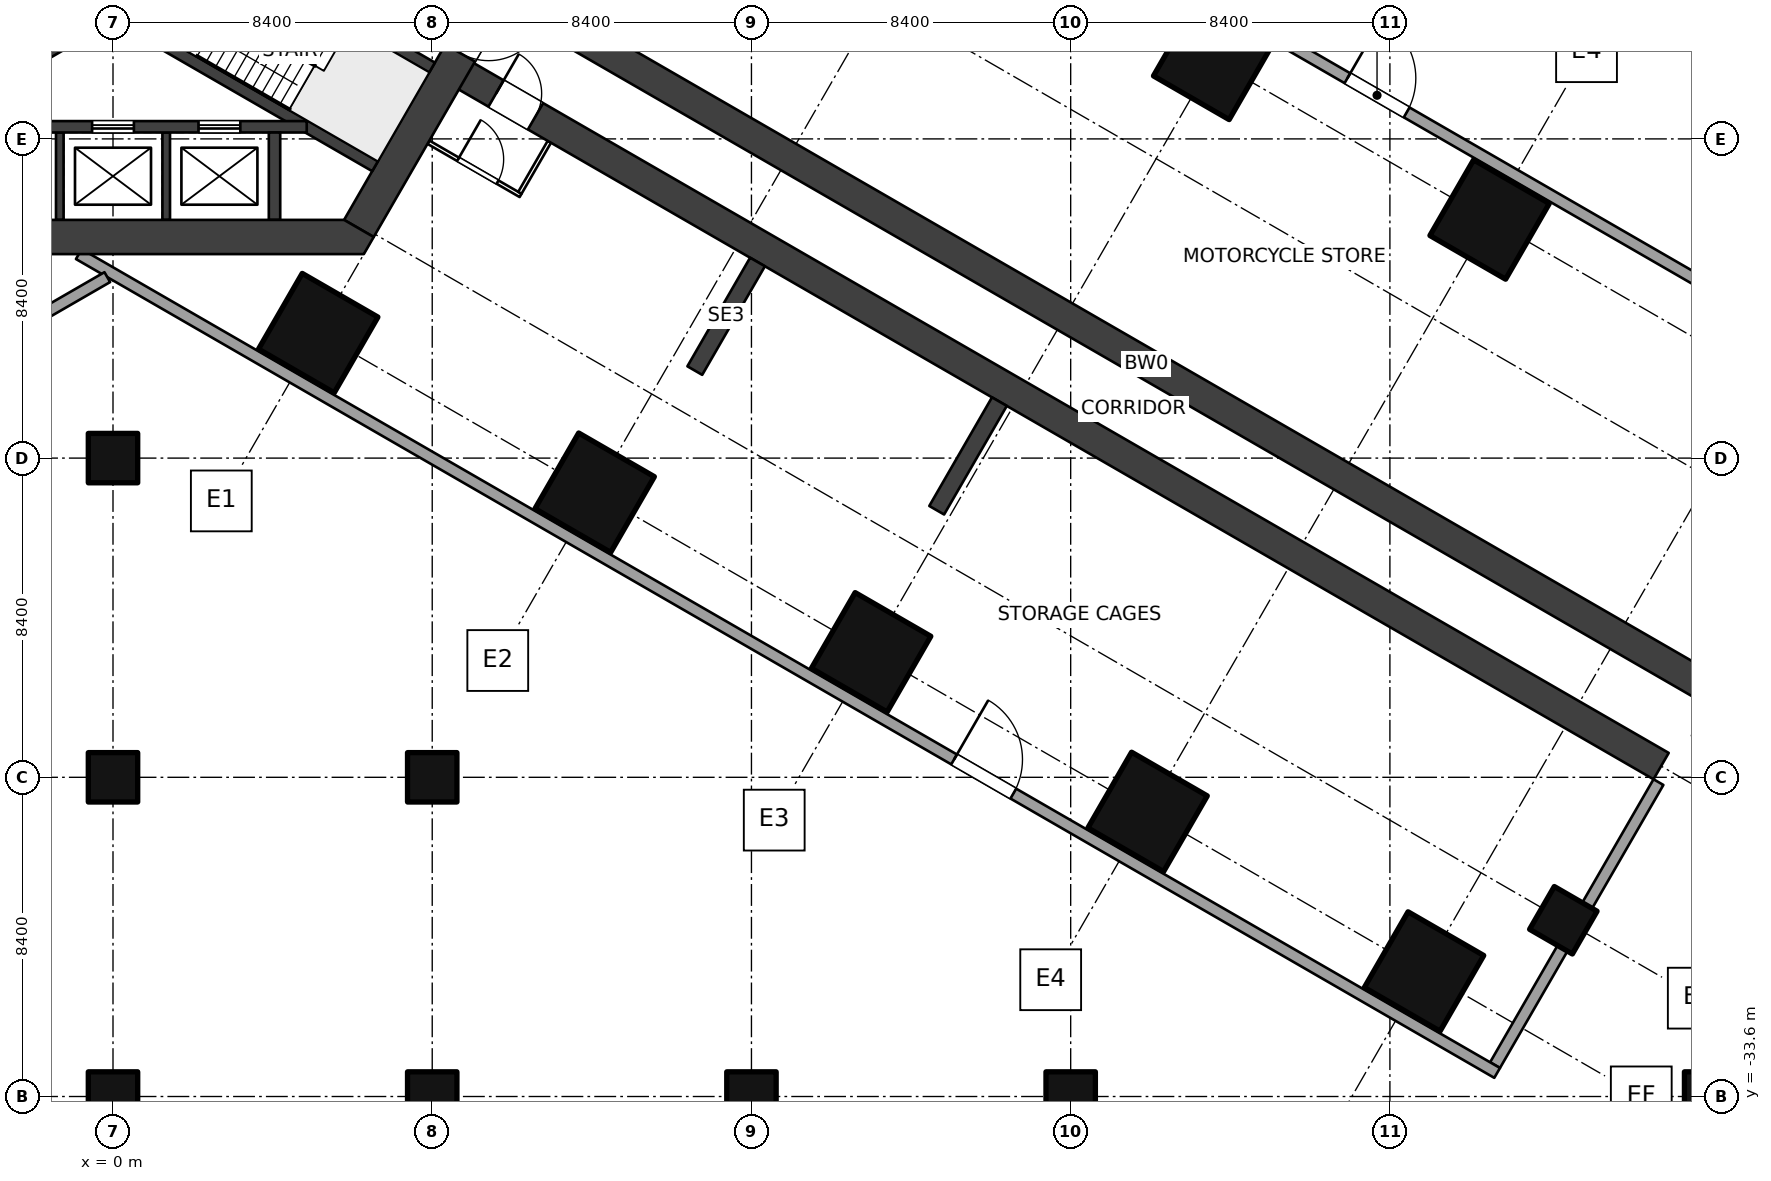
"""IFC4 building model, lengths in metres.
Left out: names, types, materials, properties, quantities, classifications, styles, units other than length and angle.
Written with IfcOpenShell. Run it as: python <this file> out.ifc"""

import sys

from ifc_helpers import new_model, si_unit, direction, frame, frame_2d, origin, origin_2d, place, context, subcontext, project, spatial, polyline, rectangle, outline, extrude, element, fill, save


model = new_model("IFC4")
c1 = context("Model", 3, precision=1e-05, world=origin(), true_north=direction((0.0, 1.0)))
c2 = subcontext(c1, "Body", "Model", "MODEL_VIEW")
j1 = project(units=[si_unit("LENGTHUNIT", "METRE"), si_unit("PLANEANGLEUNIT", "RADIAN")], contexts=[c1])
p1 = place(None, origin())
s1 = spatial("IfcSite", under=j1, at=p1, CompositionType="ELEMENT")
p2 = place(p1, origin())
s2 = spatial("IfcBuilding", under=s1, at=p2, CompositionType="ELEMENT")
p3 = place(p2, frame((0.0, 0.0, -7.0)))
s3 = spatial("IfcBuildingStorey", under=s2, at=p3, CompositionType="ELEMENT", Elevation=-7.0)
for number, where, z_axis, x_axis in (
    (1, (5.4, -13.51, 0.0), (0.0, 0.0, 1.0), (-0.5, -0.866, 0.0)),
    (2, (12.675, -17.71, 0.0), (0.0, 0.0, 1.0), (-0.5, -0.866, 0.0)),
    (3, (28.949, -6.322, 0.0), (0.0, 0.0, 1.0), (-0.5, -0.866, 0.0)),
    (4, (19.949, -21.91, 0.0), (0.0, 0.0, 1.0), (-0.5, -0.866, 0.0)),
    (5, (36.224, -10.521, 0.0), (0.0, 0.0, 1.0), (-0.5, -0.866, 0.0)),
    (6, (27.224, -26.11, 0.0), (0.0, 0.0, 1.0), (-0.5, -0.866, 0.0)),
    (7, (34.499, -30.31, 0.0), (0.0, 0.0, 1.0), (-0.5, -0.866, 0.0)),
):
    element("IfcColumn", number, at=place(p3, frame(where, z_axis=z_axis, x_axis=x_axis)), inside=s3, PredefinedType="COLUMN", context=c2, shape_type="SweptSolid", body=[
        extrude(rectangle(XDim=2.3, YDim=2.3, at=origin_2d()), origin(), (0.0, 0.0, 1.0), 3.5),
    ])
for number, where, z_axis, x_axis in (
    (8, (38.164, -28.962, 0.0), (0.0, 0.0, 1.0), (-0.5, -0.866, 0.0)),
    (9, (0.0, -33.6, 0.0), (0.0, 0.0, 1.0), (1.0, 0.0, 0.0)),
    (10, (0.0, -25.2, 0.0), (0.0, 0.0, 1.0), (1.0, 0.0, 0.0)),
    (11, (0.0, -16.8, 0.0), (0.0, 0.0, 1.0), (1.0, 0.0, 0.0)),
    (12, (8.4, -33.6, 0.0), (0.0, 0.0, 1.0), (1.0, 0.0, 0.0)),
    (13, (8.4, -25.2, 0.0), (0.0, 0.0, 1.0), (1.0, 0.0, 0.0)),
    (14, (16.8, -33.6, 0.0), (0.0, 0.0, 1.0), (1.0, 0.0, 0.0)),
    (15, (25.2, -33.6, 0.0), (0.0, 0.0, 1.0), (1.0, 0.0, 0.0)),
    (16, (42.0, -33.6, 0.0), (0.0, 0.0, 1.0), (1.0, 0.0, 0.0)),
):
    element("IfcColumn", number, at=place(p3, frame(where, z_axis=z_axis, x_axis=x_axis)), inside=s3, PredefinedType="COLUMN", context=c2, shape_type="SweptSolid", body=[
        extrude(rectangle(XDim=1.3, YDim=1.3, at=origin_2d()), origin(), (0.0, 0.0, 1.0), 3.5),
    ])
p4 = place(p3, frame((12.551, -0.225, 0.0), z_axis=(0.0, 0.0, 1.0), x_axis=(-0.499997612506, -0.8660267822, 0.0)))
e17 = element("IfcWall", 17, at=p4, inside=s3, PredefinedType="SHEAR", context=c2, shape_type="SweptSolid", body=[
    extrude(rectangle(XDim=12.161, YDim=0.9, at=frame_2d((6.08, 0.0))), origin(), (0.0, 0.0, 1.0), 3.5),
])
p5 = place(p4, frame((5.33, 0.0, 0.0)))
e18 = element("IfcOpeningElement", 18, at=p5, cuts=e17, PredefinedType="OPENING", context=c2, shape_type="SweptSolid", body=[
    extrude(rectangle(XDim=1.5, YDim=2.1, at=frame_2d((0.75, 1.05))), frame((0.0, 0.46, 0.0), z_axis=(0.0, -1.0, 0.0), x_axis=(1.0, 0.0, 0.0)), (0.0, 0.0, 1.0), 0.92),
])
p6 = place(p3, origin())
e19 = element("IfcWall", 19, at=p6, inside=s3, PredefinedType="SHEAR", context=c2, shape_type="SweptSolid", body=[
    extrude(outline(polyline([(-6.6, -11.432), (6.6, -11.432), (6.86, -10.981), (6.08, -10.531), (-6.08, -10.531), (-6.86, -10.981), (-6.6, -11.432)])), origin(), (0.0, 0.0, 1.0), 3.5),
])
p7 = place(p3, frame((-0.919, -5.669, 0.0), z_axis=(0.0, 0.0, 1.0), x_axis=(-0.866011800373, -0.500023561059, 0.0)))
e20 = element("IfcWall", 20, at=p7, inside=s3, PredefinedType="SHEAR", context=c2, shape_type="SweptSolid", body=[
    extrude(rectangle(XDim=6.902, YDim=0.3, at=frame_2d((3.451, 0.0))), origin(), (0.0, 0.0, 1.0), 3.5),
])
p8 = place(p3, frame((2.419, -3.071, 0.0), z_axis=(0.0, 0.0, 1.0), x_axis=(0.86602711848, -0.499997030048, 0.0)))
e21 = element("IfcWall", 21, at=p8, inside=s3, PredefinedType="SHEAR", context=c2, shape_type="SweptSolid", body=[
    extrude(rectangle(XDim=6.901, YDim=0.3, at=frame_2d((3.451, 0.0))), origin(), (0.0, 0.0, 1.0), 3.5),
])
p9 = place(p8, frame((0.25, 0.0, 0.0)))
e22 = element("IfcOpeningElement", 22, at=p9, cuts=e21, PredefinedType="OPENING", context=c2, shape_type="SweptSolid", body=[
    extrude(rectangle(XDim=1.0, YDim=2.1, at=frame_2d((0.5, 1.05))), frame((0.0, 0.16, 0.0), z_axis=(0.0, -1.0, 0.0), x_axis=(1.0, 0.0, 0.0)), (0.0, 0.0, 1.0), 0.32),
])
p10 = place(p3, frame((0.919, -5.669, 0.0), z_axis=(0.0, 0.0, 1.0), x_axis=(0.866011800373, -0.500023561059, 0.0)))
e23 = element("IfcWall", 23, at=p10, inside=s3, PredefinedType="SHEAR", context=c2, shape_type="SweptSolid", body=[
    extrude(rectangle(XDim=6.902, YDim=0.3, at=frame_2d((3.451, 0.0))), origin(), (0.0, 0.0, 1.0), 3.5),
])
p11 = place(p3, frame((5.098, -8.082, 0.0), z_axis=(0.0, 0.0, 1.0), x_axis=(-1.0, 0.0, 0.0)))
e24 = element("IfcWall", 24, at=p11, inside=s3, PredefinedType="SHEAR", context=c2, shape_type="SweptSolid", body=[
    extrude(rectangle(XDim=10.195, YDim=0.3, at=frame_2d((5.098, 0.0))), origin(), (0.0, 0.0, 1.0), 3.5),
])
p12 = place(p11, frame((1.748, 0.0, 0.0)))
e25 = element("IfcOpeningElement", 25, at=p12, cuts=e24, PredefinedType="OPENING", context=c2, shape_type="SweptSolid", body=[
    extrude(rectangle(XDim=1.1, YDim=2.1, at=frame_2d((0.55, 1.05))), frame((0.0, 0.16, 0.0), z_axis=(0.0, -1.0, 0.0), x_axis=(1.0, 0.0, 0.0)), (0.0, 0.0, 1.0), 0.32),
])
p13 = place(p11, frame((4.548, 0.0, 0.0)))
e26 = element("IfcOpeningElement", 26, at=p13, cuts=e24, PredefinedType="OPENING", context=c2, shape_type="SweptSolid", body=[
    extrude(rectangle(XDim=1.1, YDim=2.1, at=frame_2d((0.55, 1.05))), frame((0.0, 0.16, 0.0), z_axis=(0.0, -1.0, 0.0), x_axis=(1.0, 0.0, 0.0)), (0.0, 0.0, 1.0), 0.32),
])
p14 = place(p11, frame((7.348, 0.0, 0.0)))
e27 = element("IfcOpeningElement", 27, at=p14, cuts=e24, PredefinedType="OPENING", context=c2, shape_type="SweptSolid", body=[
    extrude(rectangle(XDim=1.1, YDim=2.1, at=frame_2d((0.55, 1.05))), frame((0.0, 0.16, 0.0), z_axis=(0.0, -1.0, 0.0), x_axis=(1.0, 0.0, 0.0)), (0.0, 0.0, 1.0), 0.32),
])
p15 = place(p3, frame((4.25, -8.231, 0.0), z_axis=(0.0, 0.0, 1.0), x_axis=(0.0, -1.0, 0.0)))
e28 = element("IfcWall", 28, at=p15, inside=s3, PredefinedType="SHEAR", context=c2, shape_type="SweptSolid", body=[
    extrude(rectangle(XDim=2.3, YDim=0.3, at=frame_2d((1.15, 0.0))), origin(), (0.0, 0.0, 1.0), 3.5),
])
for number, where, z_axis, x_axis in (
    (29, (1.4, -8.231, 0.0), (0.0, 0.0, 1.0), (0.0, -1.0, 0.0)),
    (30, (-1.4, -8.231, 0.0), (0.0, 0.0, 1.0), (0.0, -1.0, 0.0)),
):
    element("IfcWall", number, at=place(p3, frame(where, z_axis=z_axis, x_axis=x_axis)), inside=s3, PredefinedType="SHEAR", context=c2, shape_type="SweptSolid", body=[
        extrude(rectangle(XDim=2.3, YDim=0.2, at=frame_2d((1.15, 0.0))), origin(), (0.0, 0.0, 1.0), 3.5),
    ])
p16 = place(p3, frame((10.11, -4.451, 0.0), z_axis=(0.0, 0.0, 1.0), x_axis=(0.866025284237, -0.500000207062, 0.0)))
e31 = element("IfcWall", 31, at=p16, inside=s3, PredefinedType="SHEAR", context=c2, shape_type="SweptSolid", body=[
    extrude(rectangle(XDim=36.75, YDim=0.8, at=frame_2d((18.375, 0.0))), origin(), (0.0, 0.0, 1.0), 3.5),
])
p17 = place(p16, frame((1.35, 0.0, 0.0)))
e32 = element("IfcOpeningElement", 32, at=p17, cuts=e31, PredefinedType="OPENING", context=c2, shape_type="SweptSolid", body=[
    extrude(rectangle(XDim=1.2, YDim=2.1, at=frame_2d((0.6, 1.05))), frame((0.0, 0.41, 0.0), z_axis=(0.0, -1.0, 0.0), x_axis=(1.0, 0.0, 0.0)), (0.0, 0.0, 1.0), 0.82),
])
p18 = place(p3, frame((8.91, -6.53, 0.0), z_axis=(0.0, 0.0, 1.0), x_axis=(0.866025284237, -0.500000207062, 0.0)))
e33 = element("IfcWall", 33, at=p18, inside=s3, PredefinedType="SHEAR", context=c2, shape_type="SweptSolid", body=[
    extrude(rectangle(XDim=36.75, YDim=0.8, at=frame_2d((18.375, 0.0))), origin(), (0.0, 0.0, 1.0), 3.5),
])
p19 = place(p18, frame((1.35, 0.0, 0.0)))
e34 = element("IfcOpeningElement", 34, at=p19, cuts=e33, PredefinedType="OPENING", context=c2, shape_type="SweptSolid", body=[
    extrude(rectangle(XDim=1.2, YDim=2.1, at=frame_2d((0.6, 1.05))), frame((0.0, 0.41, 0.0), z_axis=(0.0, -1.0, 0.0), x_axis=(1.0, 0.0, 0.0)), (0.0, 0.0, 1.0), 0.82),
])
p20 = place(p3, frame((8.3, -8.487, 0.0), z_axis=(0.0, 0.0, 1.0), x_axis=(0.866034573852, -0.49998411664, 0.0)))
e35 = element("IfcWall", 35, at=p20, inside=s3, PredefinedType="PARTITIONING", context=c2, shape_type="SweptSolid", body=[
    extrude(rectangle(XDim=2.8, YDim=0.1, at=frame_2d((1.4, 0.0))), origin(), (0.0, 0.0, 1.0), 3.2),
])
p21 = place(p20, frame((0.9, 0.0, 0.0)))
e36 = element("IfcOpeningElement", 36, at=p21, cuts=e35, PredefinedType="OPENING", context=c2, shape_type="SweptSolid", body=[
    extrude(rectangle(XDim=1.2, YDim=2.1, at=frame_2d((0.6, 1.05))), frame((0.0, 0.06, 0.0), z_axis=(0.0, -1.0, 0.0), x_axis=(1.0, 0.0, 0.0)), (0.0, 0.0, 1.0), 0.12),
])
p22 = place(p3, frame((11.482, -8.476, 0.0), z_axis=(0.0, 0.0, 1.0), x_axis=(-0.500017819788, -0.86601511528, 0.0)))
e37 = element("IfcWall", 37, at=p22, inside=s3, PredefinedType="PARTITIONING", context=c2, shape_type="SweptSolid", body=[
    extrude(rectangle(XDim=1.55, YDim=0.1, at=frame_2d((0.775, 0.0))), origin(), (0.0, 0.0, 1.0), 3.2),
])
p23 = place(p3, frame((40.667, -25.326, 0.0), z_axis=(0.0, 0.0, 1.0), x_axis=(-0.500007509209, -0.866021068297, 0.0)))
e38 = element("IfcWall", 38, at=p23, inside=s3, PredefinedType="SOLIDWALL", context=c2, shape_type="SweptSolid", body=[
    extrude(rectangle(XDim=8.6, YDim=0.3, at=frame_2d((4.3, 0.0))), origin(), (0.0, 0.0, 1.0), 1.9),
])
p24 = place(p3, frame((-0.15, -12.038, 0.0), z_axis=(0.0, 0.0, 1.0), x_axis=(-0.866026292622, -0.499998460486, 0.0)))
e39 = element("IfcWall", 39, at=p24, inside=s3, PredefinedType="SOLIDWALL", context=c2, shape_type="SweptSolid", body=[
    extrude(rectangle(XDim=41.883, YDim=0.3, at=frame_2d((20.941, 0.0))), origin(), (0.0, 0.0, 1.0), 3.2),
])
p25 = place(p24, frame((25.383, 0.0, 0.0)))
e40 = element("IfcOpeningElement", 40, at=p25, cuts=e39, PredefinedType="OPENING", context=c2, shape_type="SweptSolid", body=[
    extrude(rectangle(XDim=1.8, YDim=2.4, at=frame_2d((0.9, 1.2))), frame((0.0, 0.16, 0.0), z_axis=(0.0, -1.0, 0.0), x_axis=(1.0, 0.0, 0.0)), (0.0, 0.0, 1.0), 0.32),
])
p26 = place(p3, frame((9.45, 6.495, 0.0), z_axis=(0.0, 0.0, 1.0), x_axis=(0.866025301493, -0.500000177174, 0.0)))
e41 = element("IfcWall", 41, at=p26, inside=s3, PredefinedType="SOLIDWALL", context=c2, shape_type="SweptSolid", body=[
    extrude(rectangle(XDim=43.095, YDim=0.3, at=frame_2d((21.548, 0.0))), origin(), (0.0, 0.0, 1.0), 3.2),
])
p27 = place(p26, frame((26.595, 0.0, 0.0)))
e42 = element("IfcOpeningElement", 42, at=p27, cuts=e41, PredefinedType="OPENING", context=c2, shape_type="SweptSolid", body=[
    extrude(rectangle(XDim=1.8, YDim=2.4, at=frame_2d((0.9, 1.2))), frame((0.0, 0.16, 0.0), z_axis=(0.0, -1.0, 0.0), x_axis=(1.0, 0.0, 0.0)), (0.0, 0.0, 1.0), 0.32),
])
p28 = place(p3, frame((-0.9, -11.432, 0.0), z_axis=(0.0, 0.0, 1.0), x_axis=(0.866025301493, -0.500000177174, 0.0)))
e43 = element("IfcWall", 43, at=p28, inside=s3, PredefinedType="SOLIDWALL", context=c2, shape_type="SweptSolid", body=[
    extrude(rectangle(XDim=43.095, YDim=0.3, at=frame_2d((21.548, 0.0))), origin(), (0.0, 0.0, 1.0), 3.2),
])
p29 = place(p28, frame((26.595, 0.0, 0.0)))
e44 = element("IfcOpeningElement", 44, at=p29, cuts=e43, PredefinedType="OPENING", context=c2, shape_type="SweptSolid", body=[
    extrude(rectangle(XDim=1.8, YDim=2.4, at=frame_2d((0.9, 1.2))), frame((0.0, 0.16, 0.0), z_axis=(0.0, -1.0, 0.0), x_axis=(1.0, 0.0, 0.0)), (0.0, 0.0, 1.0), 0.32),
])
for number, where, z_axis, x_axis in (
    (45, (16.959, -11.639, 0.0), (0.0, 0.0, 1.0), (-0.5, -0.866, 0.0)),
    (46, (23.324, -15.314, 0.0), (0.0, 0.0, 1.0), (-0.5, -0.866, 0.0)),
):
    element("IfcWall", number, at=place(p3, frame(where, z_axis=z_axis, x_axis=x_axis)), inside=s3, PredefinedType="SOLIDWALL", context=c2, shape_type="SweptSolid", body=[
        extrude(rectangle(XDim=3.3, YDim=0.45, at=frame_2d((1.65, 0.0))), origin(), (0.0, 0.0, 1.0), 3.5),
    ])
p30 = place(p12, origin())
e47 = element("IfcDoor", 47, at=p30, inside=s3, OperationType="DOUBLE_DOOR_SLIDING", PredefinedType="DOOR", context=c2, shape_type="SweptSolid", body=[
    extrude(rectangle(XDim=1.1, YDim=2.1, at=frame_2d((0.55, 1.05))), frame((0.0, 0.025, 0.0), z_axis=(0.0, -1.0, 0.0), x_axis=(1.0, 0.0, 0.0)), (0.0, 0.0, 1.0), 0.05),
])
fill(e25, e47)
p31 = place(p13, origin())
e48 = element("IfcDoor", 48, at=p31, inside=s3, OperationType="DOUBLE_DOOR_SLIDING", PredefinedType="DOOR", context=c2, shape_type="SweptSolid", body=[
    extrude(rectangle(XDim=1.1, YDim=2.1, at=frame_2d((0.55, 1.05))), frame((0.0, 0.025, 0.0), z_axis=(0.0, -1.0, 0.0), x_axis=(1.0, 0.0, 0.0)), (0.0, 0.0, 1.0), 0.05),
])
fill(e26, e48)
p32 = place(p5, origin())
e49 = element("IfcDoor", 49, at=p32, inside=s3, OperationType="DOUBLE_DOOR_DOUBLE_SWING", PredefinedType="DOOR", context=c2, shape_type="SweptSolid", body=[
    extrude(rectangle(XDim=1.5, YDim=2.1, at=frame_2d((0.75, 1.05))), frame((0.0, 0.025, 0.0), z_axis=(0.0, -1.0, 0.0), x_axis=(1.0, 0.0, 0.0)), (0.0, 0.0, 1.0), 0.05),
])
fill(e18, e49)
p33 = place(p19, origin())
e50 = element("IfcDoor", 50, at=p33, inside=s3, OperationType="DOUBLE_SWING_LEFT", PredefinedType="DOOR", context=c2, shape_type="SweptSolid", body=[
    extrude(rectangle(XDim=1.2, YDim=2.1, at=frame_2d((0.6, 1.05))), frame((0.0, 0.025, 0.0), z_axis=(0.0, -1.0, 0.0), x_axis=(1.0, 0.0, 0.0)), (0.0, 0.0, 1.0), 0.05),
])
fill(e34, e50)
p34 = place(p21, origin())
e51 = element("IfcDoor", 51, at=p34, inside=s3, OperationType="DOUBLE_SWING_LEFT", PredefinedType="DOOR", context=c2, shape_type="SweptSolid", body=[
    extrude(rectangle(XDim=1.2, YDim=2.1, at=frame_2d((0.6, 1.05))), frame((0.0, 0.025, 0.0), z_axis=(0.0, -1.0, 0.0), x_axis=(1.0, 0.0, 0.0)), (0.0, 0.0, 1.0), 0.05),
])
fill(e36, e51)
p35 = place(p27, origin())
e52 = element("IfcDoor", 52, at=p35, inside=s3, OperationType="DOUBLE_DOOR_DOUBLE_SWING", PredefinedType="DOOR", context=c2, shape_type="SweptSolid", body=[
    extrude(rectangle(XDim=1.8, YDim=2.4, at=frame_2d((0.9, 1.2))), frame((0.0, 0.025, 0.0), z_axis=(0.0, -1.0, 0.0), x_axis=(1.0, 0.0, 0.0)), (0.0, 0.0, 1.0), 0.05),
])
fill(e42, e52)
p36 = place(p29, origin())
e53 = element("IfcDoor", 53, at=p36, inside=s3, OperationType="DOUBLE_DOOR_DOUBLE_SWING", PredefinedType="DOOR", context=c2, shape_type="SweptSolid", body=[
    extrude(rectangle(XDim=1.8, YDim=2.4, at=frame_2d((0.9, 1.2))), frame((0.0, 0.025, 0.0), z_axis=(0.0, -1.0, 0.0), x_axis=(1.0, 0.0, 0.0)), (0.0, 0.0, 1.0), 0.05),
])
fill(e44, e53)
save(model, sys.argv[1])
